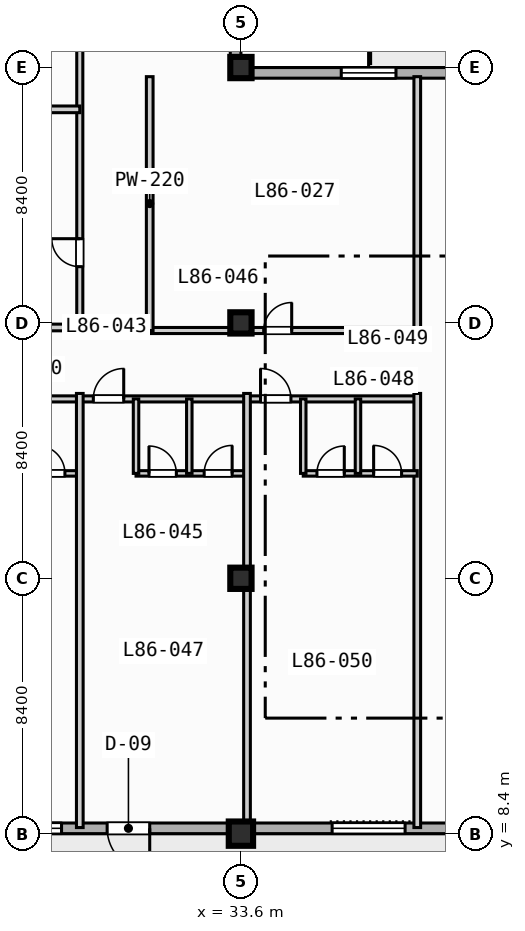
"""IFC4 building model, lengths in metres.
Left out: names, types, materials, properties, quantities, classifications, styles, units other than length and angle.
Written with IfcOpenShell. Run it as: python <this file> out.ifc"""

import sys

from ifc_helpers import new_model, si_unit, direction, frame, frame_2d, origin, origin_2d, place, context, subcontext, project, spatial, rectangle, extrude, element, fill, save


model = new_model("IFC4")
c1 = context("Model", 3, precision=1e-05, world=origin(), true_north=direction((0.0, 1.0)))
c2 = subcontext(c1, "Body", "Model", "MODEL_VIEW")
j1 = project(units=[si_unit("LENGTHUNIT", "METRE"), si_unit("PLANEANGLEUNIT", "RADIAN")], contexts=[c1])
p1 = place(None, origin())
s1 = spatial("IfcSite", under=j1, at=p1, CompositionType="ELEMENT")
p2 = place(p1, origin())
s2 = spatial("IfcBuilding", under=s1, at=p2, CompositionType="ELEMENT")
p3 = place(p2, frame((0.0, 0.0, 347.6)))
s3 = spatial("IfcBuildingStorey", under=s2, at=p3, CompositionType="ELEMENT", Elevation=347.6)
p4 = place(p3, frame((33.6, 8.4, 0.0), z_axis=(0.0, 0.0, 1.0), x_axis=(1.0, 0.0, 0.0)))
e1 = element("IfcColumn", 1, at=p4, inside=s3, PredefinedType="COLUMN", context=c2, shape_type="SweptSolid", body=[
    extrude(rectangle(XDim=0.8, YDim=0.8, at=origin_2d()), origin(), (0.0, 0.0, 1.0), 3.9),
])
for number, where, z_axis, x_axis in (
    (2, (33.6, 16.8, 0.0), (0.0, 0.0, 1.0), (1.0, 0.0, 0.0)),
    (3, (33.6, 25.2, 0.0), (0.0, 0.0, 1.0), (1.0, 0.0, 0.0)),
    (4, (33.6, 33.6, 0.0), (0.0, 0.0, 1.0), (1.0, 0.0, 0.0)),
):
    element("IfcColumn", number, at=place(p3, frame(where, z_axis=z_axis, x_axis=x_axis)), inside=s3, PredefinedType="COLUMN", context=c2, shape_type="SweptSolid", body=[
        extrude(rectangle(XDim=0.7, YDim=0.7, at=origin_2d()), origin(), (0.0, 0.0, 1.0), 3.9),
    ])
p5 = place(p3, frame((33.425, 72.425, 0.0), z_axis=(0.0, 0.0, 1.0), x_axis=(0.0, -1.0, 0.0)))
e5 = element("IfcWall", 5, at=p5, inside=s3, PredefinedType="STANDARD", context=c2, shape_type="SweptSolid", body=[
    extrude(rectangle(XDim=39.0, YDim=0.35, at=frame_2d((19.5, 0.0))), origin(), (0.0, 0.0, 1.0), 3.67),
])
p6 = place(p5, frame((5.9, 0.0, 0.85)))
e6 = element("IfcOpeningElement", 6, at=p6, cuts=e5, PredefinedType="OPENING", context=c2, shape_type="SweptSolid", body=[
    extrude(rectangle(XDim=1.8, YDim=1.8, at=frame_2d((0.9, 0.9))), frame((0.0, 0.185, 0.0), z_axis=(0.0, -1.0, 0.0), x_axis=(1.0, 0.0, 0.0)), (0.0, 0.0, 1.0), 0.37),
])
p7 = place(p3, frame((33.425, 33.425, 0.0), z_axis=(0.0, 0.0, 1.0), x_axis=(1.0, 0.0, 0.0)))
e7 = element("IfcWall", 7, at=p7, inside=s3, PredefinedType="STANDARD", context=c2, shape_type="SweptSolid", body=[
    extrude(rectangle(XDim=30.6, YDim=0.35, at=frame_2d((15.3, 0.0))), origin(), (0.0, 0.0, 1.0), 3.67),
])
p8 = place(p7, frame((12.075, 0.0, 0.0)))
e8 = element("IfcOpeningElement", 8, at=p8, cuts=e7, PredefinedType="OPENING", context=c2, shape_type="SweptSolid", body=[
    extrude(rectangle(XDim=1.4, YDim=2.2, at=frame_2d((0.7, 1.1))), frame((0.0, 0.185, 0.0), z_axis=(0.0, -1.0, 0.0), x_axis=(1.0, 0.0, 0.0)), (0.0, 0.0, 1.0), 0.37),
])
p9 = place(p7, frame((3.475, 0.0, 0.85)))
e9 = element("IfcOpeningElement", 9, at=p9, cuts=e7, PredefinedType="OPENING", context=c2, shape_type="SweptSolid", body=[
    extrude(rectangle(XDim=1.8, YDim=1.8, at=frame_2d((0.9, 0.9))), frame((0.0, 0.185, 0.0), z_axis=(0.0, -1.0, 0.0), x_axis=(1.0, 0.0, 0.0)), (0.0, 0.0, 1.0), 0.37),
])
p10 = place(p3, frame((64.025, 8.575, 0.0), z_axis=(0.0, 0.0, 1.0), x_axis=(-1.0, 0.0, 0.0)))
e10 = element("IfcWall", 10, at=p10, inside=s3, PredefinedType="STANDARD", context=c2, shape_type="SweptSolid", body=[
    extrude(rectangle(XDim=52.45, YDim=0.35, at=frame_2d((26.225, 0.0))), origin(), (0.0, 0.0, 1.0), 3.67),
])
p11 = place(p10, frame((33.425, 0.0, 0.0)))
e11 = element("IfcOpeningElement", 11, at=p11, cuts=e10, PredefinedType="OPENING", context=c2, shape_type="SweptSolid", body=[
    extrude(rectangle(XDim=1.4, YDim=2.2, at=frame_2d((0.7, 1.1))), frame((0.0, 0.185, 0.0), z_axis=(0.0, -1.0, 0.0), x_axis=(1.0, 0.0, 0.0)), (0.0, 0.0, 1.0), 0.37),
])
p12 = place(p10, frame((41.825, 0.0, 0.85)))
e12 = element("IfcOpeningElement", 12, at=p12, cuts=e10, PredefinedType="OPENING", context=c2, shape_type="SweptSolid", body=[
    extrude(rectangle(XDim=2.4, YDim=1.95, at=frame_2d((1.2, 0.975))), frame((0.0, 0.185, 0.0), z_axis=(0.0, -1.0, 0.0), x_axis=(1.0, 0.0, 0.0)), (0.0, 0.0, 1.0), 0.37),
])
p13 = place(p10, frame((25.025, 0.0, 0.85)))
e13 = element("IfcOpeningElement", 13, at=p13, cuts=e10, PredefinedType="OPENING", context=c2, shape_type="SweptSolid", body=[
    extrude(rectangle(XDim=2.4, YDim=1.95, at=frame_2d((1.2, 0.975))), frame((0.0, 0.185, 0.0), z_axis=(0.0, -1.0, 0.0), x_axis=(1.0, 0.0, 0.0)), (0.0, 0.0, 1.0), 0.37),
])
p14 = place(p10, frame((16.925, 0.0, 0.85)))
e14 = element("IfcOpeningElement", 14, at=p14, cuts=e10, PredefinedType="OPENING", context=c2, shape_type="SweptSolid", body=[
    extrude(rectangle(XDim=1.8, YDim=1.8, at=frame_2d((0.9, 0.9))), frame((0.0, 0.185, 0.0), z_axis=(0.0, -1.0, 0.0), x_axis=(1.0, 0.0, 0.0)), (0.0, 0.0, 1.0), 0.37),
])
p15 = place(p10, frame((48.575, 0.0, 0.85)))
e15 = element("IfcOpeningElement", 15, at=p15, cuts=e10, PredefinedType="OPENING", context=c2, shape_type="SweptSolid", body=[
    extrude(rectangle(XDim=1.8, YDim=1.8, at=frame_2d((0.9, 0.9))), frame((0.0, 0.185, 0.0), z_axis=(0.0, -1.0, 0.0), x_axis=(1.0, 0.0, 0.0)), (0.0, 0.0, 1.0), 0.37),
])
p16 = place(p10, frame((36.325, 0.0, 0.85)))
e16 = element("IfcOpeningElement", 16, at=p16, cuts=e10, PredefinedType="OPENING", context=c2, shape_type="SweptSolid", body=[
    extrude(rectangle(XDim=1.8, YDim=1.8, at=frame_2d((0.9, 0.9))), frame((0.0, 0.185, 0.0), z_axis=(0.0, -1.0, 0.0), x_axis=(1.0, 0.0, 0.0)), (0.0, 0.0, 1.0), 0.37),
])
p17 = place(p3, frame((30.6, 24.95, 0.0), z_axis=(0.0, 0.0, 1.0), x_axis=(1.0, 0.0, 0.0)))
e17 = element("IfcWall", 17, at=p17, inside=s3, PredefinedType="PARTITIONING", context=c2, shape_type="SweptSolid", body=[
    extrude(rectangle(XDim=8.8, YDim=0.2, at=frame_2d((4.4, 0.0))), origin(), (0.0, 0.0, 1.0), 3.07),
])
p18 = place(p17, frame((3.75, 0.0, 0.0)))
e18 = element("IfcOpeningElement", 18, at=p18, cuts=e17, PredefinedType="OPENING", context=c2, shape_type="SweptSolid", body=[
    extrude(rectangle(XDim=0.92, YDim=2.1, at=frame_2d((0.46, 1.05))), frame((0.0, 0.11, 0.0), z_axis=(0.0, -1.0, 0.0), x_axis=(1.0, 0.0, 0.0)), (0.0, 0.0, 1.0), 0.22),
])
for number, where, z_axis, x_axis in (
    (19, (30.6, 24.95, 0.0), (0.0, 0.0, 1.0), (0.0, 1.0, 0.0)),
    (20, (39.4, 24.95, 0.0), (0.0, 0.0, 1.0), (0.0, 1.0, 0.0)),
):
    element("IfcWall", number, at=place(p3, frame(where, z_axis=z_axis, x_axis=x_axis)), inside=s3, PredefinedType="PARTITIONING", context=c2, shape_type="SweptSolid", body=[
        extrude(rectangle(XDim=8.35, YDim=0.22, at=frame_2d((4.175, 0.0))), origin(), (0.0, 0.0, 1.0), 3.67),
    ])
p19 = place(p3, frame((11.8, 22.7, 0.0), z_axis=(0.0, 0.0, 1.0), x_axis=(1.0, 0.0, 0.0)))
e21 = element("IfcWall", 21, at=p19, inside=s3, PredefinedType="PARTITIONING", context=c2, shape_type="SweptSolid", body=[
    extrude(rectangle(XDim=27.6, YDim=0.2, at=frame_2d((13.8, 0.0))), origin(), (0.0, 0.0, 1.0), 3.67),
])
p20 = place(p19, frame((0.445, 0.0, 0.0)))
e22 = element("IfcOpeningElement", 22, at=p20, cuts=e21, PredefinedType="OPENING", context=c2, shape_type="SweptSolid", body=[
    extrude(rectangle(XDim=1.0, YDim=2.15, at=frame_2d((0.5, 1.075))), frame((0.0, 0.11, 0.0), z_axis=(0.0, -1.0, 0.0), x_axis=(1.0, 0.0, 0.0)), (0.0, 0.0, 1.0), 0.22),
])
p21 = place(p19, frame((5.945, 0.0, 0.0)))
e23 = element("IfcOpeningElement", 23, at=p21, cuts=e21, PredefinedType="OPENING", context=c2, shape_type="SweptSolid", body=[
    extrude(rectangle(XDim=1.0, YDim=2.15, at=frame_2d((0.5, 1.075))), frame((0.0, 0.11, 0.0), z_axis=(0.0, -1.0, 0.0), x_axis=(1.0, 0.0, 0.0)), (0.0, 0.0, 1.0), 0.22),
])
p22 = place(p19, frame((11.445, 0.0, 0.0)))
e24 = element("IfcOpeningElement", 24, at=p22, cuts=e21, PredefinedType="OPENING", context=c2, shape_type="SweptSolid", body=[
    extrude(rectangle(XDim=1.0, YDim=2.15, at=frame_2d((0.5, 1.075))), frame((0.0, 0.11, 0.0), z_axis=(0.0, -1.0, 0.0), x_axis=(1.0, 0.0, 0.0)), (0.0, 0.0, 1.0), 0.22),
])
p23 = place(p19, frame((16.945, 0.0, 0.0)))
e25 = element("IfcOpeningElement", 25, at=p23, cuts=e21, PredefinedType="OPENING", context=c2, shape_type="SweptSolid", body=[
    extrude(rectangle(XDim=1.0, YDim=2.15, at=frame_2d((0.5, 1.075))), frame((0.0, 0.11, 0.0), z_axis=(0.0, -1.0, 0.0), x_axis=(1.0, 0.0, 0.0)), (0.0, 0.0, 1.0), 0.22),
])
p24 = place(p19, frame((22.445, 0.0, 0.0)))
e26 = element("IfcOpeningElement", 26, at=p24, cuts=e21, PredefinedType="OPENING", context=c2, shape_type="SweptSolid", body=[
    extrude(rectangle(XDim=1.0, YDim=2.15, at=frame_2d((0.5, 1.075))), frame((0.0, 0.11, 0.0), z_axis=(0.0, -1.0, 0.0), x_axis=(1.0, 0.0, 0.0)), (0.0, 0.0, 1.0), 0.22),
])
p25 = place(p3, frame((24.65, 20.25, 0.0), z_axis=(0.0, 0.0, 1.0), x_axis=(1.0, 0.0, 0.0)))
e27 = element("IfcWall", 27, at=p25, inside=s3, PredefinedType="PLUMBINGWALL", context=c2, shape_type="SweptSolid", body=[
    extrude(rectangle(XDim=3.65, YDim=0.18, at=frame_2d((1.825, 0.0))), origin(), (0.0, 0.0, 1.0), 3.67),
])
p26 = place(p25, frame((0.426, 0.0, 0.0)))
e28 = element("IfcOpeningElement", 28, at=p26, cuts=e27, PredefinedType="OPENING", context=c2, shape_type="SweptSolid", body=[
    extrude(rectangle(XDim=0.9, YDim=2.1, at=frame_2d((0.45, 1.05))), frame((0.0, 0.1, 0.0), z_axis=(0.0, -1.0, 0.0), x_axis=(1.0, 0.0, 0.0)), (0.0, 0.0, 1.0), 0.2),
])
p27 = place(p25, frame((2.241, 0.0, 0.0)))
e29 = element("IfcOpeningElement", 29, at=p27, cuts=e27, PredefinedType="OPENING", context=c2, shape_type="SweptSolid", body=[
    extrude(rectangle(XDim=0.92, YDim=2.1, at=frame_2d((0.46, 1.05))), frame((0.0, 0.1, 0.0), z_axis=(0.0, -1.0, 0.0), x_axis=(1.0, 0.0, 0.0)), (0.0, 0.0, 1.0), 0.2),
])
p28 = place(p3, frame((28.3, 8.6, 0.0), z_axis=(0.0, 0.0, 1.0), x_axis=(0.0, 1.0, 0.0)))
e30 = element("IfcWall", 30, at=p28, inside=s3, PredefinedType="PARTITIONING", context=c2, shape_type="SweptSolid", body=[
    extrude(rectangle(XDim=14.28, YDim=0.22, at=frame_2d((7.14, 0.0))), origin(), (0.0, 0.0, 1.0), 3.67),
])
p29 = place(p3, frame((30.15, 20.25, 0.0), z_axis=(0.0, 0.0, 1.0), x_axis=(1.0, 0.0, 0.0)))
e31 = element("IfcWall", 31, at=p29, inside=s3, PredefinedType="PLUMBINGWALL", context=c2, shape_type="SweptSolid", body=[
    extrude(rectangle(XDim=3.65, YDim=0.18, at=frame_2d((1.825, 0.0))), origin(), (0.0, 0.0, 1.0), 3.67),
])
p30 = place(p29, frame((0.426, 0.0, 0.0)))
e32 = element("IfcOpeningElement", 32, at=p30, cuts=e31, PredefinedType="OPENING", context=c2, shape_type="SweptSolid", body=[
    extrude(rectangle(XDim=0.9, YDim=2.1, at=frame_2d((0.45, 1.05))), frame((0.0, 0.1, 0.0), z_axis=(0.0, -1.0, 0.0), x_axis=(1.0, 0.0, 0.0)), (0.0, 0.0, 1.0), 0.2),
])
p31 = place(p29, frame((2.241, 0.0, 0.0)))
e33 = element("IfcOpeningElement", 33, at=p31, cuts=e31, PredefinedType="OPENING", context=c2, shape_type="SweptSolid", body=[
    extrude(rectangle(XDim=0.92, YDim=2.1, at=frame_2d((0.46, 1.05))), frame((0.0, 0.1, 0.0), z_axis=(0.0, -1.0, 0.0), x_axis=(1.0, 0.0, 0.0)), (0.0, 0.0, 1.0), 0.2),
])
for number, where, z_axis, x_axis in (
    (34, (30.15, 20.25, 0.0), (0.0, 0.0, 1.0), (0.0, 1.0, 0.0)),
    (35, (31.902, 20.25, 0.0), (0.0, 0.0, 1.0), (0.0, 1.0, 0.0)),
):
    element("IfcWall", number, at=place(p3, frame(where, z_axis=z_axis, x_axis=x_axis)), inside=s3, PredefinedType="PLUMBINGWALL", context=c2, shape_type="SweptSolid", body=[
        extrude(rectangle(XDim=2.45, YDim=0.18, at=frame_2d((1.225, 0.0))), origin(), (0.0, 0.0, 1.0), 3.67),
    ])
p32 = place(p3, frame((33.8, 8.6, 0.0), z_axis=(0.0, 0.0, 1.0), x_axis=(0.0, 1.0, 0.0)))
e36 = element("IfcWall", 36, at=p32, inside=s3, PredefinedType="PARTITIONING", context=c2, shape_type="SweptSolid", body=[
    extrude(rectangle(XDim=14.28, YDim=0.22, at=frame_2d((7.14, 0.0))), origin(), (0.0, 0.0, 1.0), 3.059),
])
p33 = place(p3, frame((39.4, 8.6, 0.0), z_axis=(0.0, 0.0, 1.0), x_axis=(0.0, 1.0, 0.0)))
e37 = element("IfcWall", 37, at=p33, inside=s3, PredefinedType="PARTITIONING", context=c2, shape_type="SweptSolid", body=[
    extrude(rectangle(XDim=14.28, YDim=0.22, at=frame_2d((7.14, 0.0))), origin(), (0.0, 0.0, 1.0), 3.67),
])
p34 = place(p3, frame((35.65, 20.25, 0.0), z_axis=(0.0, 0.0, 1.0), x_axis=(1.0, 0.0, 0.0)))
e38 = element("IfcWall", 38, at=p34, inside=s3, PredefinedType="PLUMBINGWALL", context=c2, shape_type="SweptSolid", body=[
    extrude(rectangle(XDim=3.75, YDim=0.18, at=frame_2d((1.875, 0.0))), origin(), (0.0, 0.0, 1.0), 3.67),
])
p35 = place(p34, frame((0.45, 0.0, 0.0)))
e39 = element("IfcOpeningElement", 39, at=p35, cuts=e38, PredefinedType="OPENING", context=c2, shape_type="SweptSolid", body=[
    extrude(rectangle(XDim=0.9, YDim=2.1, at=frame_2d((0.45, 1.05))), frame((0.0, 0.1, 0.0), z_axis=(0.0, -1.0, 0.0), x_axis=(1.0, 0.0, 0.0)), (0.0, 0.0, 1.0), 0.2),
])
p36 = place(p34, frame((2.315, 0.0, 0.0)))
e40 = element("IfcOpeningElement", 40, at=p36, cuts=e38, PredefinedType="OPENING", context=c2, shape_type="SweptSolid", body=[
    extrude(rectangle(XDim=0.92, YDim=2.1, at=frame_2d((0.46, 1.05))), frame((0.0, 0.1, 0.0), z_axis=(0.0, -1.0, 0.0), x_axis=(1.0, 0.0, 0.0)), (0.0, 0.0, 1.0), 0.2),
])
for number, where, z_axis, x_axis in (
    (41, (35.65, 20.25, 0.0), (0.0, 0.0, 1.0), (0.0, 1.0, 0.0)),
    (42, (37.45, 20.25, 0.0), (0.0, 0.0, 1.0), (0.0, 1.0, 0.0)),
):
    element("IfcWall", number, at=place(p3, frame(where, z_axis=z_axis, x_axis=x_axis)), inside=s3, PredefinedType="PLUMBINGWALL", context=c2, shape_type="SweptSolid", body=[
        extrude(rectangle(XDim=2.45, YDim=0.18, at=frame_2d((1.225, 0.0))), origin(), (0.0, 0.0, 1.0), 3.67),
    ])
p37 = place(p3, frame((28.3, 25.05, 0.0), z_axis=(0.0, 0.0, 1.0), x_axis=(0.0, 1.0, 0.0)))
e43 = element("IfcWall", 43, at=p37, inside=s3, PredefinedType="PARTITIONING", context=c2, shape_type="SweptSolid", body=[
    extrude(rectangle(XDim=14.35, YDim=0.2, at=frame_2d((7.175, 0.0))), origin(), (0.0, 0.0, 1.0), 3.67),
])
p38 = place(p37, frame((2.0, 0.0, 0.0)))
e44 = element("IfcOpeningElement", 44, at=p38, cuts=e43, PredefinedType="OPENING", context=c2, shape_type="SweptSolid", body=[
    extrude(rectangle(XDim=0.92, YDim=2.1, at=frame_2d((0.46, 1.05))), frame((0.0, 0.11, 0.0), z_axis=(0.0, -1.0, 0.0), x_axis=(1.0, 0.0, 0.0)), (0.0, 0.0, 1.0), 0.22),
])
p39 = place(p37, frame((9.175, 0.0, 0.0)))
e45 = element("IfcOpeningElement", 45, at=p39, cuts=e43, PredefinedType="OPENING", context=c2, shape_type="SweptSolid", body=[
    extrude(rectangle(XDim=0.92, YDim=2.1, at=frame_2d((0.46, 1.05))), frame((0.0, 0.11, 0.0), z_axis=(0.0, -1.0, 0.0), x_axis=(1.0, 0.0, 0.0)), (0.0, 0.0, 1.0), 0.22),
])
p40 = place(p3, frame((8.7, 25.05, 0.0), z_axis=(0.0, 0.0, 1.0), x_axis=(1.0, 0.0, 0.0)))
e46 = element("IfcWall", 46, at=p40, inside=s3, PredefinedType="PARTITIONING", context=c2, shape_type="SweptSolid", body=[
    extrude(rectangle(XDim=19.6, YDim=0.22, at=frame_2d((9.8, 0.0))), origin(), (0.0, 0.0, 1.0), 3.059),
])
p41 = place(p3, frame((8.7, 32.225, 0.0), z_axis=(0.0, 0.0, 1.0), x_axis=(1.0, 0.0, 0.0)))
e47 = element("IfcWall", 47, at=p41, inside=s3, PredefinedType="PARTITIONING", context=c2, shape_type="SweptSolid", body=[
    extrude(rectangle(XDim=19.6, YDim=0.22, at=frame_2d((9.8, 0.0))), origin(), (0.0, 0.0, 1.0), 3.67),
])
p42 = place(p9, origin())
e48 = element("IfcWindow", 48, at=p42, inside=s3, PartitioningType="SINGLE_PANEL", PredefinedType="WINDOW", context=c2, shape_type="SweptSolid", body=[
    extrude(rectangle(XDim=1.8, YDim=1.8, at=frame_2d((0.9, 0.9))), frame((0.0, 0.03, 0.0), z_axis=(0.0, -1.0, 0.0), x_axis=(1.0, 0.0, 0.0)), (0.0, 0.0, 1.0), 0.06),
])
fill(e9, e48)
p43 = place(p11, origin())
e49 = element("IfcDoor", 49, at=p43, inside=s3, OperationType="SINGLE_SWING_LEFT", PredefinedType="DOOR", context=c2, shape_type="SweptSolid", body=[
    extrude(rectangle(XDim=1.4, YDim=2.2, at=frame_2d((0.7, 1.1))), frame((0.0, 0.025, 0.0), z_axis=(0.0, -1.0, 0.0), x_axis=(1.0, 0.0, 0.0)), (0.0, 0.0, 1.0), 0.05),
])
fill(e11, e49)
p44 = place(p13, origin())
e50 = element("IfcWindow", 50, at=p44, inside=s3, PartitioningType="SINGLE_PANEL", PredefinedType="WINDOW", context=c2, shape_type="SweptSolid", body=[
    extrude(rectangle(XDim=2.4, YDim=1.95, at=frame_2d((1.2, 0.975))), frame((0.0, 0.03, 0.0), z_axis=(0.0, -1.0, 0.0), x_axis=(1.0, 0.0, 0.0)), (0.0, 0.0, 1.0), 0.06),
])
fill(e13, e50)
p45 = place(p16, origin())
e51 = element("IfcWindow", 51, at=p45, inside=s3, PartitioningType="SINGLE_PANEL", PredefinedType="WINDOW", context=c2, shape_type="SweptSolid", body=[
    extrude(rectangle(XDim=1.8, YDim=1.8, at=frame_2d((0.9, 0.9))), frame((0.0, 0.03, 0.0), z_axis=(0.0, -1.0, 0.0), x_axis=(1.0, 0.0, 0.0)), (0.0, 0.0, 1.0), 0.06),
])
fill(e16, e51)
p46 = place(p18, origin())
e52 = element("IfcDoor", 52, at=p46, inside=s3, OperationType="SINGLE_SWING_RIGHT", PredefinedType="DOOR", context=c2, shape_type="SweptSolid", body=[
    extrude(rectangle(XDim=0.92, YDim=2.1, at=frame_2d((0.46, 1.05))), frame((0.0, 0.025, 0.0), z_axis=(0.0, -1.0, 0.0), x_axis=(1.0, 0.0, 0.0)), (0.0, 0.0, 1.0), 0.05),
])
fill(e18, e52)
p47 = place(p23, origin())
e53 = element("IfcDoor", 53, at=p47, inside=s3, OperationType="SINGLE_SWING_RIGHT", PredefinedType="DOOR", context=c2, shape_type="SweptSolid", body=[
    extrude(rectangle(XDim=1.0, YDim=2.15, at=frame_2d((0.5, 1.075))), frame((0.0, 0.025, 0.0), z_axis=(0.0, -1.0, 0.0), x_axis=(1.0, 0.0, 0.0)), (0.0, 0.0, 1.0), 0.05),
])
fill(e25, e53)
p48 = place(p24, origin())
e54 = element("IfcDoor", 54, at=p48, inside=s3, OperationType="SINGLE_SWING_LEFT", PredefinedType="DOOR", context=c2, shape_type="SweptSolid", body=[
    extrude(rectangle(XDim=1.0, YDim=2.15, at=frame_2d((0.5, 1.075))), frame((0.0, 0.025, 0.0), z_axis=(0.0, -1.0, 0.0), x_axis=(1.0, 0.0, 0.0)), (0.0, 0.0, 1.0), 0.05),
])
fill(e26, e54)
p49 = place(p27, origin())
e55 = element("IfcDoor", 55, at=p49, inside=s3, OperationType="SINGLE_SWING_LEFT", PredefinedType="DOOR", context=c2, shape_type="SweptSolid", body=[
    extrude(rectangle(XDim=0.92, YDim=2.1, at=frame_2d((0.46, 1.05))), frame((0.0, 0.025, 0.0), z_axis=(0.0, -1.0, 0.0), x_axis=(1.0, 0.0, 0.0)), (0.0, 0.0, 1.0), 0.05),
])
fill(e29, e55)
p50 = place(p30, origin())
e56 = element("IfcDoor", 56, at=p50, inside=s3, OperationType="SINGLE_SWING_LEFT", PredefinedType="DOOR", context=c2, shape_type="SweptSolid", body=[
    extrude(rectangle(XDim=0.9, YDim=2.1, at=frame_2d((0.45, 1.05))), frame((0.0, 0.025, 0.0), z_axis=(0.0, -1.0, 0.0), x_axis=(1.0, 0.0, 0.0)), (0.0, 0.0, 1.0), 0.05),
])
fill(e32, e56)
p51 = place(p31, origin())
e57 = element("IfcDoor", 57, at=p51, inside=s3, OperationType="SINGLE_SWING_RIGHT", PredefinedType="DOOR", context=c2, shape_type="SweptSolid", body=[
    extrude(rectangle(XDim=0.92, YDim=2.1, at=frame_2d((0.46, 1.05))), frame((0.0, 0.025, 0.0), z_axis=(0.0, -1.0, 0.0), x_axis=(1.0, 0.0, 0.0)), (0.0, 0.0, 1.0), 0.05),
])
fill(e33, e57)
p52 = place(p35, origin())
e58 = element("IfcDoor", 58, at=p52, inside=s3, OperationType="SINGLE_SWING_RIGHT", PredefinedType="DOOR", context=c2, shape_type="SweptSolid", body=[
    extrude(rectangle(XDim=0.9, YDim=2.1, at=frame_2d((0.45, 1.05))), frame((0.0, 0.025, 0.0), z_axis=(0.0, -1.0, 0.0), x_axis=(1.0, 0.0, 0.0)), (0.0, 0.0, 1.0), 0.05),
])
fill(e39, e58)
p53 = place(p36, origin())
e59 = element("IfcDoor", 59, at=p53, inside=s3, OperationType="SINGLE_SWING_LEFT", PredefinedType="DOOR", context=c2, shape_type="SweptSolid", body=[
    extrude(rectangle(XDim=0.92, YDim=2.1, at=frame_2d((0.46, 1.05))), frame((0.0, 0.025, 0.0), z_axis=(0.0, -1.0, 0.0), x_axis=(1.0, 0.0, 0.0)), (0.0, 0.0, 1.0), 0.05),
])
fill(e40, e59)
p54 = place(p38, origin())
e60 = element("IfcDoor", 60, at=p54, inside=s3, OperationType="SINGLE_SWING_RIGHT", PredefinedType="DOOR", context=c2, shape_type="SweptSolid", body=[
    extrude(rectangle(XDim=0.92, YDim=2.1, at=frame_2d((0.46, 1.05))), frame((0.0, 0.025, 0.0), z_axis=(0.0, -1.0, 0.0), x_axis=(1.0, 0.0, 0.0)), (0.0, 0.0, 1.0), 0.05),
])
fill(e44, e60)
save(model, sys.argv[1])
